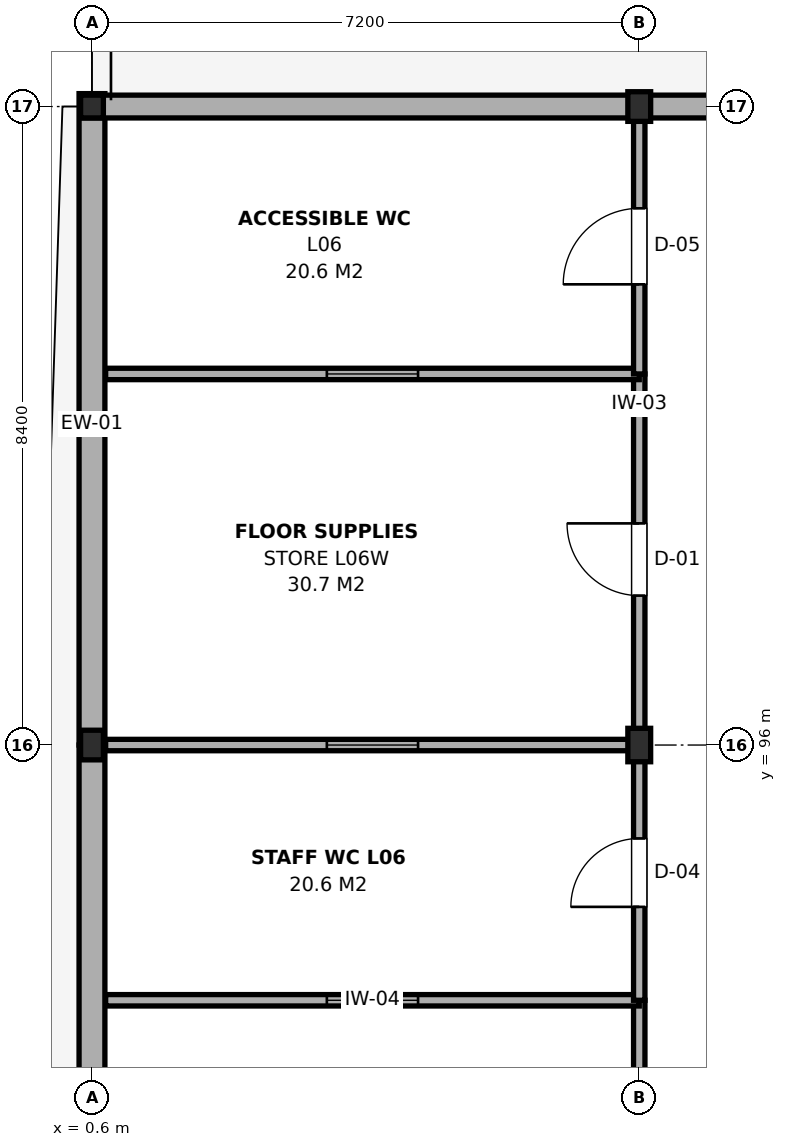
"""IFC4 building model, lengths in metres.
Left out: names, types, materials, properties, quantities, classifications, styles, units other than length and angle.
Written with IfcOpenShell. Run it as: python <this file> out.ifc"""

import sys

from ifc_helpers import new_model, si_unit, direction, frame, frame_2d, origin, origin_2d, place, context, subcontext, project, spatial, rectangle, i_section, extrude, element, fill, save


model = new_model("IFC4")
c1 = context("Model", 3, precision=1e-05, world=origin(), true_north=direction((0.0, 1.0)))
c2 = subcontext(c1, "Body", "Model", "MODEL_VIEW")
j1 = project(units=[si_unit("LENGTHUNIT", "METRE"), si_unit("PLANEANGLEUNIT", "RADIAN")], contexts=[c1])
p1 = place(None, origin())
s1 = spatial("IfcSite", under=j1, at=p1, CompositionType="ELEMENT")
p2 = place(p1, origin())
s2 = spatial("IfcBuilding", under=s1, at=p2, CompositionType="ELEMENT")
p3 = place(p2, frame((0.0, 0.0, 24.9)))
s3 = spatial("IfcBuildingStorey", under=s2, at=p3, CompositionType="ELEMENT", Elevation=24.9)
p4 = place(p3, frame((0.6, 96.0, 0.0), z_axis=(0.0, 0.0, 1.0), x_axis=(1.0, 0.0, 0.0)))
e1 = element("IfcColumn", 1, at=p4, inside=s3, PredefinedType="COLUMN", context=c2, shape_type="SweptSolid", body=[
    extrude(i_section(OverallWidth=0.3, OverallDepth=0.39, WebThickness=0.011, FlangeThickness=0.019, FilletRadius=0.027, at=origin_2d()), origin(), (0.0, 0.0, 1.0), 3.9),
])
p5 = place(p3, frame((0.6, 104.4, 0.0), z_axis=(0.0, 0.0, 1.0), x_axis=(1.0, 0.0, 0.0)))
e2 = element("IfcColumn", 2, at=p5, inside=s3, PredefinedType="COLUMN", context=c2, shape_type="SweptSolid", body=[
    extrude(i_section(OverallWidth=0.3, OverallDepth=0.3, WebThickness=0.011, FlangeThickness=0.019, FilletRadius=0.027, at=origin_2d()), origin(), (0.0, 0.0, 1.0), 3.9),
])
p6 = place(p3, frame((7.8, 96.0, 0.0), z_axis=(0.0, 0.0, 1.0), x_axis=(1.0, 0.0, 0.0)))
e3 = element("IfcColumn", 3, at=p6, inside=s3, PredefinedType="COLUMN", context=c2, shape_type="SweptSolid", body=[
    extrude(i_section(OverallWidth=0.3, OverallDepth=0.44, WebThickness=0.011, FlangeThickness=0.021, FilletRadius=0.027, at=origin_2d()), origin(), (0.0, 0.0, 1.0), 3.9),
])
p7 = place(p3, frame((7.8, 104.4, 0.0), z_axis=(0.0, 0.0, 1.0), x_axis=(1.0, 0.0, 0.0)))
e4 = element("IfcColumn", 4, at=p7, inside=s3, PredefinedType="COLUMN", context=c2, shape_type="SweptSolid", body=[
    extrude(i_section(OverallWidth=0.3, OverallDepth=0.39, WebThickness=0.011, FlangeThickness=0.019, FilletRadius=0.027, at=origin_2d()), origin(), (0.0, 0.0, 1.0), 3.9),
])
p8 = place(p3, frame((0.6, 88.2, 0.0), z_axis=(0.0, 0.0, 1.0), x_axis=(0.0, 1.0, 0.0)))
e5 = element("IfcWall", 5, at=p8, inside=s3, PredefinedType="SOLIDWALL", context=c2, shape_type="SweptSolid", body=[
    extrude(rectangle(XDim=7.8, YDim=0.34, at=frame_2d((3.9, 0.0))), origin(), (0.0, 0.0, 1.0), 3.225),
])
p9 = place(p3, frame((0.6, 96.0, 0.0), z_axis=(0.0, 0.0, 1.0), x_axis=(0.0, 1.0, 0.0)))
e6 = element("IfcWall", 6, at=p9, inside=s3, PredefinedType="SOLIDWALL", context=c2, shape_type="SweptSolid", body=[
    extrude(rectangle(XDim=8.57, YDim=0.34, at=frame_2d((4.285, 0.0))), origin(), (0.0, 0.0, 1.0), 3.225),
])
p10 = place(p3, frame((0.45, 104.4, 0.0), z_axis=(0.0, 0.0, 1.0), x_axis=(1.0, 0.0, 0.0)))
e7 = element("IfcWall", 7, at=p10, inside=s3, PredefinedType="SOLIDWALL", context=c2, shape_type="SweptSolid", body=[
    extrude(rectangle(XDim=7.35, YDim=0.3, at=frame_2d((3.675, 0.0))), origin(), (0.0, 0.0, 1.0), 3.265),
])
p11 = place(p3, frame((7.8, 104.4, 0.0), z_axis=(0.0, 0.0, 1.0), x_axis=(1.0, 0.0, 0.0)))
e8 = element("IfcWall", 8, at=p11, inside=s3, PredefinedType="SOLIDWALL", context=c2, shape_type="SweptSolid", body=[
    extrude(rectangle(XDim=7.2, YDim=0.3, at=frame_2d((3.6, 0.0))), origin(), (0.0, 0.0, 1.0), 3.265),
])
p12 = place(p11, frame((2.7, 0.0, 0.0)))
e9 = element("IfcOpeningElement", 9, at=p12, cuts=e8, PredefinedType="OPENING", context=c2, shape_type="SweptSolid", body=[
    extrude(rectangle(XDim=1.8, YDim=2.2, at=frame_2d((0.9, 1.1))), frame((0.0, 0.165, 0.0), z_axis=(0.0, -1.0, 0.0), x_axis=(1.0, 0.0, 0.0)), (0.0, 0.0, 1.0), 0.33),
])
p13 = place(p3, frame((7.8, 88.4, 0.0), z_axis=(0.0, 0.0, 1.0), x_axis=(0.0, 1.0, 0.0)))
e10 = element("IfcWall", 10, at=p13, inside=s3, PredefinedType="PARTITIONING", context=c2, shape_type="SweptSolid", body=[
    extrude(rectangle(XDim=4.242, YDim=0.15, at=frame_2d((2.121, 0.0))), origin(), (0.0, 0.0, 1.0), 3.115),
])
p14 = place(p13, frame((1.646, 0.0, 0.0)))
e11 = element("IfcOpeningElement", 11, at=p14, cuts=e10, PredefinedType="OPENING", context=c2, shape_type="SweptSolid", body=[
    extrude(rectangle(XDim=0.95, YDim=2.15, at=frame_2d((0.475, 1.075))), frame((0.0, 0.09, 0.0), z_axis=(0.0, -1.0, 0.0), x_axis=(1.0, 0.0, 0.0)), (0.0, 0.0, 1.0), 0.18),
])
p15 = place(p3, frame((0.78, 92.642, 0.0), z_axis=(0.0, 0.0, 1.0), x_axis=(1.0, 0.0, 0.0)))
e12 = element("IfcWall", 12, at=p15, inside=s3, PredefinedType="PARTITIONING", context=c2, shape_type="SweptSolid", body=[
    extrude(rectangle(XDim=7.02, YDim=0.15, at=frame_2d((3.51, 0.0))), origin(), (0.0, 0.0, 1.0), 3.115),
])
p16 = place(p15, frame((2.91, 0.0, 0.95)))
e13 = element("IfcOpeningElement", 13, at=p16, cuts=e12, PredefinedType="OPENING", context=c2, shape_type="SweptSolid", body=[
    extrude(rectangle(XDim=1.2, YDim=1.5, at=frame_2d((0.6, 0.75))), frame((0.0, 0.09, 0.0), z_axis=(0.0, -1.0, 0.0), x_axis=(1.0, 0.0, 0.0)), (0.0, 0.0, 1.0), 0.18),
])
p17 = place(p3, frame((7.8, 92.642, 0.0), z_axis=(0.0, 0.0, 1.0), x_axis=(0.0, 1.0, 0.0)))
e14 = element("IfcWall", 14, at=p17, inside=s3, PredefinedType="PARTITIONING", context=c2, shape_type="SweptSolid", body=[
    extrude(rectangle(XDim=3.358, YDim=0.15, at=frame_2d((1.679, 0.0))), origin(), (0.0, 0.0, 1.0), 3.115),
])
p18 = place(p17, frame((1.229, 0.0, 0.0)))
e15 = element("IfcOpeningElement", 15, at=p18, cuts=e14, PredefinedType="OPENING", context=c2, shape_type="SweptSolid", body=[
    extrude(rectangle(XDim=0.9, YDim=2.15, at=frame_2d((0.45, 1.075))), frame((0.0, 0.09, 0.0), z_axis=(0.0, -1.0, 0.0), x_axis=(1.0, 0.0, 0.0)), (0.0, 0.0, 1.0), 0.18),
])
p19 = place(p3, frame((7.8, 96.0, 0.0), z_axis=(0.0, 0.0, 1.0), x_axis=(0.0, 1.0, 0.0)))
e16 = element("IfcWall", 16, at=p19, inside=s3, PredefinedType="PARTITIONING", context=c2, shape_type="SweptSolid", body=[
    extrude(rectangle(XDim=4.882, YDim=0.15, at=frame_2d((2.441, 0.0))), origin(), (0.0, 0.0, 1.0), 3.115),
])
p20 = place(p19, frame((1.966, 0.0, 0.0)))
e17 = element("IfcOpeningElement", 17, at=p20, cuts=e16, PredefinedType="OPENING", context=c2, shape_type="SweptSolid", body=[
    extrude(rectangle(XDim=0.95, YDim=2.15, at=frame_2d((0.475, 1.075))), frame((0.0, 0.09, 0.0), z_axis=(0.0, -1.0, 0.0), x_axis=(1.0, 0.0, 0.0)), (0.0, 0.0, 1.0), 0.18),
])
p21 = place(p3, frame((0.78, 100.882, 0.0), z_axis=(0.0, 0.0, 1.0), x_axis=(1.0, 0.0, 0.0)))
e18 = element("IfcWall", 18, at=p21, inside=s3, PredefinedType="PARTITIONING", context=c2, shape_type="SweptSolid", body=[
    extrude(rectangle(XDim=7.02, YDim=0.15, at=frame_2d((3.51, 0.0))), origin(), (0.0, 0.0, 1.0), 3.225),
])
p22 = place(p21, frame((2.91, 0.0, 0.95)))
e19 = element("IfcOpeningElement", 19, at=p22, cuts=e18, PredefinedType="OPENING", context=c2, shape_type="SweptSolid", body=[
    extrude(rectangle(XDim=1.2, YDim=1.5, at=frame_2d((0.6, 0.75))), frame((0.0, 0.09, 0.0), z_axis=(0.0, -1.0, 0.0), x_axis=(1.0, 0.0, 0.0)), (0.0, 0.0, 1.0), 0.18),
])
p23 = place(p3, frame((7.8, 100.882, 0.0), z_axis=(0.0, 0.0, 1.0), x_axis=(0.0, 1.0, 0.0)))
e20 = element("IfcWall", 20, at=p23, inside=s3, PredefinedType="PARTITIONING", context=c2, shape_type="SweptSolid", body=[
    extrude(rectangle(XDim=3.358, YDim=0.15, at=frame_2d((1.679, 0.0))), origin(), (0.0, 0.0, 1.0), 3.265),
])
p24 = place(p23, frame((1.179, 0.0, 0.0)))
e21 = element("IfcOpeningElement", 21, at=p24, cuts=e20, PredefinedType="OPENING", context=c2, shape_type="SweptSolid", body=[
    extrude(rectangle(XDim=1.0, YDim=2.15, at=frame_2d((0.5, 1.075))), frame((0.0, 0.09, 0.0), z_axis=(0.0, -1.0, 0.0), x_axis=(1.0, 0.0, 0.0)), (0.0, 0.0, 1.0), 0.18),
])
p25 = place(p3, frame((0.78, 96.0, 0.0), z_axis=(0.0, 0.0, 1.0), x_axis=(1.0, 0.0, 0.0)))
e22 = element("IfcWall", 22, at=p25, inside=s3, PredefinedType="PARTITIONING", context=c2, shape_type="SweptSolid", body=[
    extrude(rectangle(XDim=7.02, YDim=0.15, at=frame_2d((3.51, 0.0))), origin(), (0.0, 0.0, 1.0), 3.115),
])
p26 = place(p25, frame((2.91, 0.0, 0.95)))
e23 = element("IfcOpeningElement", 23, at=p26, cuts=e22, PredefinedType="OPENING", context=c2, shape_type="SweptSolid", body=[
    extrude(rectangle(XDim=1.2, YDim=1.5, at=frame_2d((0.6, 0.75))), frame((0.0, 0.09, 0.0), z_axis=(0.0, -1.0, 0.0), x_axis=(1.0, 0.0, 0.0)), (0.0, 0.0, 1.0), 0.18),
])
p27 = place(p16, origin())
e24 = element("IfcWindow", 24, at=p27, inside=s3, PartitioningType="SINGLE_PANEL", PredefinedType="WINDOW", context=c2, shape_type="SweptSolid", body=[
    extrude(rectangle(XDim=1.2, YDim=1.5, at=frame_2d((0.6, 0.75))), frame((0.0, 0.03, 0.0), z_axis=(0.0, -1.0, 0.0), x_axis=(1.0, 0.0, 0.0)), (0.0, 0.0, 1.0), 0.06),
])
fill(e13, e24)
p28 = place(p18, origin())
e25 = element("IfcDoor", 25, at=p28, inside=s3, OperationType="SINGLE_SWING_LEFT", PredefinedType="DOOR", context=c2, shape_type="SweptSolid", body=[
    extrude(rectangle(XDim=0.9, YDim=2.15, at=frame_2d((0.45, 1.075))), frame((0.0, 0.025, 0.0), z_axis=(0.0, -1.0, 0.0), x_axis=(1.0, 0.0, 0.0)), (0.0, 0.0, 1.0), 0.05),
])
fill(e15, e25)
p29 = place(p20, origin())
e26 = element("IfcDoor", 26, at=p29, inside=s3, OperationType="SINGLE_SWING_RIGHT", PredefinedType="DOOR", context=c2, shape_type="SweptSolid", body=[
    extrude(rectangle(XDim=0.95, YDim=2.15, at=frame_2d((0.475, 1.075))), frame((0.0, 0.025, 0.0), z_axis=(0.0, -1.0, 0.0), x_axis=(1.0, 0.0, 0.0)), (0.0, 0.0, 1.0), 0.05),
])
fill(e17, e26)
p30 = place(p22, origin())
e27 = element("IfcWindow", 27, at=p30, inside=s3, PartitioningType="SINGLE_PANEL", PredefinedType="WINDOW", context=c2, shape_type="SweptSolid", body=[
    extrude(rectangle(XDim=1.2, YDim=1.5, at=frame_2d((0.6, 0.75))), frame((0.0, 0.03, 0.0), z_axis=(0.0, -1.0, 0.0), x_axis=(1.0, 0.0, 0.0)), (0.0, 0.0, 1.0), 0.06),
])
fill(e19, e27)
p31 = place(p24, origin())
e28 = element("IfcDoor", 28, at=p31, inside=s3, OperationType="SINGLE_SWING_LEFT", PredefinedType="DOOR", context=c2, shape_type="SweptSolid", body=[
    extrude(rectangle(XDim=1.0, YDim=2.15, at=frame_2d((0.5, 1.075))), frame((0.0, 0.025, 0.0), z_axis=(0.0, -1.0, 0.0), x_axis=(1.0, 0.0, 0.0)), (0.0, 0.0, 1.0), 0.05),
])
fill(e21, e28)
p32 = place(p26, origin())
e29 = element("IfcWindow", 29, at=p32, inside=s3, PartitioningType="SINGLE_PANEL", PredefinedType="WINDOW", context=c2, shape_type="SweptSolid", body=[
    extrude(rectangle(XDim=1.2, YDim=1.5, at=frame_2d((0.6, 0.75))), frame((0.0, 0.03, 0.0), z_axis=(0.0, -1.0, 0.0), x_axis=(1.0, 0.0, 0.0)), (0.0, 0.0, 1.0), 0.06),
])
fill(e23, e29)
save(model, sys.argv[1])
